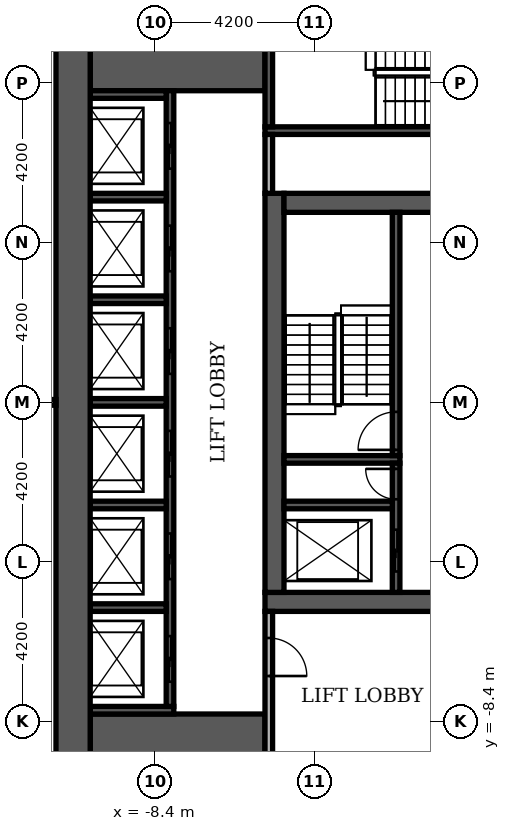
"""IFC4 building model, lengths in metres.
Left out: names, types, materials, properties, quantities, classifications, styles, units other than length and angle.
Written with IfcOpenShell. Run it as: python <this file> out.ifc"""

import sys

from ifc_helpers import new_model, si_unit, direction, frame, frame_2d, origin, place, context, subcontext, project, spatial, rectangle, extrude, element, fill, save


model = new_model("IFC4")
c1 = context("Model", 3, precision=1e-05, world=origin(), true_north=direction((0.0, 1.0)))
c2 = subcontext(c1, "Body", "Model", "MODEL_VIEW")
j1 = project(units=[si_unit("LENGTHUNIT", "METRE"), si_unit("PLANEANGLEUNIT", "RADIAN")], contexts=[c1])
p1 = place(None, origin())
s1 = spatial("IfcSite", under=j1, at=p1, CompositionType="ELEMENT")
p2 = place(p1, origin())
s2 = spatial("IfcBuilding", under=s1, at=p2, CompositionType="ELEMENT")
p3 = place(p2, origin())
s3 = spatial("IfcBuildingStorey", under=s2, at=p3, CompositionType="ELEMENT", Elevation=0.0)
p4 = place(p3, frame((-5.5, -5.25, 0.0), z_axis=(0.0, 0.0, 1.0), x_axis=(1.0, 0.0, 0.0)))
e1 = element("IfcWall", 1, at=p4, inside=s3, PredefinedType="SHEAR", context=c2, shape_type="SweptSolid", body=[
    extrude(rectangle(XDim=11.0, YDim=0.5, at=frame_2d((5.5, 0.0))), origin(), (0.0, 0.0, 1.0), 6.78),
])
p5 = place(p4, frame((4.9, 0.0, 0.0)))
e2 = element("IfcOpeningElement", 2, at=p5, cuts=e1, PredefinedType="OPENING", context=c2, shape_type="SweptSolid", body=[
    extrude(rectangle(XDim=1.2, YDim=2.1, at=frame_2d((0.6, 1.05))), frame((0.0, 0.26, 0.0), z_axis=(0.0, -1.0, 0.0), x_axis=(1.0, 0.0, 0.0)), (0.0, 0.0, 1.0), 0.52),
])
p6 = place(p3, frame((-5.25, -5.0, 0.0), z_axis=(0.0, 0.0, 1.0), x_axis=(0.0, 1.0, 0.0)))
e3 = element("IfcWall", 3, at=p6, inside=s3, PredefinedType="SHEAR", context=c2, shape_type="SweptSolid", body=[
    extrude(rectangle(XDim=10.5, YDim=0.5, at=frame_2d((5.25, 0.0))), origin(), (0.0, 0.0, 1.0), 6.78),
])
p7 = place(p3, frame((-5.0, 5.25, 0.0), z_axis=(0.0, 0.0, 1.0), x_axis=(1.0, 0.0, 0.0)))
e4 = element("IfcWall", 4, at=p7, inside=s3, PredefinedType="SHEAR", context=c2, shape_type="SweptSolid", body=[
    extrude(rectangle(XDim=10.0, YDim=0.5, at=frame_2d((5.0, 0.0))), origin(), (0.0, 0.0, 1.0), 6.78),
])
p8 = place(p7, frame((4.4, 0.0, 0.0)))
e5 = element("IfcOpeningElement", 5, at=p8, cuts=e4, PredefinedType="OPENING", context=c2, shape_type="SweptSolid", body=[
    extrude(rectangle(XDim=1.2, YDim=2.1, at=frame_2d((0.6, 1.05))), frame((0.0, 0.26, 0.0), z_axis=(0.0, -1.0, 0.0), x_axis=(1.0, 0.0, 0.0)), (0.0, 0.0, 1.0), 0.52),
])
for number, where, z_axis, x_axis in (
    (6, (-10.1, -9.15, 0.0), (0.0, 0.0, 1.0), (1.0, 0.0, 0.0)),
    (7, (-10.1, 9.15, 0.0), (0.0, 0.0, 1.0), (1.0, 0.0, 0.0)),
):
    element("IfcWall", number, at=place(p3, frame(where, z_axis=z_axis, x_axis=x_axis)), inside=s3, PredefinedType="SHEAR", context=c2, shape_type="SweptSolid", body=[
        extrude(rectangle(XDim=4.6, YDim=1.9, at=frame_2d((2.3, 0.0))), origin(), (0.0, 0.0, 1.0), 6.78),
    ])
p9 = place(p3, frame((-5.0, -1.5, 0.0), z_axis=(0.0, 0.0, 1.0), x_axis=(1.0, 0.0, 0.0)))
e8 = element("IfcWall", 8, at=p9, inside=s3, PredefinedType="SHEAR", context=c2, shape_type="SweptSolid", body=[
    extrude(rectangle(XDim=3.05, YDim=0.2, at=frame_2d((1.525, 0.0))), origin(), (0.0, 0.0, 1.0), 6.78),
])
p10 = place(p3, frame((-2.05, -1.4, 0.0), z_axis=(0.0, 0.0, 1.0), x_axis=(0.0, 1.0, 0.0)))
e9 = element("IfcWall", 9, at=p10, inside=s3, PredefinedType="SHEAR", context=c2, shape_type="SweptSolid", body=[
    extrude(rectangle(XDim=6.4, YDim=0.2, at=frame_2d((3.2, 0.0))), origin(), (0.0, 0.0, 1.0), 6.78),
])
p11 = place(p10, frame((0.15, 0.0, 0.0)))
e10 = element("IfcOpeningElement", 10, at=p11, cuts=e9, PredefinedType="OPENING", context=c2, shape_type="SweptSolid", body=[
    extrude(rectangle(XDim=1.0, YDim=2.1, at=frame_2d((0.5, 1.05))), frame((0.0, 0.11, 0.0), z_axis=(0.0, -1.0, 0.0), x_axis=(1.0, 0.0, 0.0)), (0.0, 0.0, 1.0), 0.22),
])
p12 = place(p3, frame((-5.5, 7.15, 0.0), z_axis=(0.0, 0.0, 1.0), x_axis=(1.0, 0.0, 0.0)))
e11 = element("IfcWall", 11, at=p12, inside=s3, PredefinedType="SHEAR", context=c2, shape_type="SweptSolid", body=[
    extrude(rectangle(XDim=6.8, YDim=0.2, at=frame_2d((3.4, 0.0))), origin(), (0.0, 0.0, 1.0), 6.78),
])
p13 = place(p3, frame((-5.4, 7.25, 0.0), z_axis=(0.0, 0.0, 1.0), x_axis=(0.0, 1.0, 0.0)))
e12 = element("IfcWall", 12, at=p13, inside=s3, PredefinedType="SHEAR", context=c2, shape_type="SweptSolid", body=[
    extrude(rectangle(XDim=2.85, YDim=0.2, at=frame_2d((1.425, 0.0))), origin(), (0.0, 0.0, 1.0), 6.78),
])
p14 = place(p3, frame((-10.1, -8.1, 0.0), z_axis=(0.0, 0.0, 1.0), x_axis=(1.0, 0.0, 0.0)))
e13 = element("IfcWall", 13, at=p14, inside=s3, PredefinedType="SHEAR", context=c2, shape_type="SweptSolid", body=[
    extrude(rectangle(XDim=2.2, YDim=0.2, at=frame_2d((1.1, 0.0))), origin(), (0.0, 0.0, 1.0), 6.78),
])
p15 = place(p3, frame((-8.0, -8.0, 0.0), z_axis=(0.0, 0.0, 1.0), x_axis=(0.0, 1.0, 0.0)))
e14 = element("IfcWall", 14, at=p15, inside=s3, PredefinedType="SHEAR", context=c2, shape_type="SweptSolid", body=[
    extrude(rectangle(XDim=16.2, YDim=0.2, at=frame_2d((8.1, 0.0))), origin(), (0.0, 0.0, 1.0), 6.78),
])
p16 = place(p15, frame((0.65, 0.0, 0.0)))
e15 = element("IfcOpeningElement", 15, at=p16, cuts=e14, PredefinedType="OPENING", context=c2, shape_type="SweptSolid", body=[
    extrude(rectangle(XDim=1.2, YDim=2.1, at=frame_2d((0.6, 1.05))), frame((0.0, 0.11, 0.0), z_axis=(0.0, -1.0, 0.0), x_axis=(1.0, 0.0, 0.0)), (0.0, 0.0, 1.0), 0.22),
])
p17 = place(p15, frame((3.35, 0.0, 0.0)))
e16 = element("IfcOpeningElement", 16, at=p17, cuts=e14, PredefinedType="OPENING", context=c2, shape_type="SweptSolid", body=[
    extrude(rectangle(XDim=1.2, YDim=2.1, at=frame_2d((0.6, 1.05))), frame((0.0, 0.11, 0.0), z_axis=(0.0, -1.0, 0.0), x_axis=(1.0, 0.0, 0.0)), (0.0, 0.0, 1.0), 0.22),
])
p18 = place(p15, frame((6.05, 0.0, 0.0)))
e17 = element("IfcOpeningElement", 17, at=p18, cuts=e14, PredefinedType="OPENING", context=c2, shape_type="SweptSolid", body=[
    extrude(rectangle(XDim=1.2, YDim=2.1, at=frame_2d((0.6, 1.05))), frame((0.0, 0.11, 0.0), z_axis=(0.0, -1.0, 0.0), x_axis=(1.0, 0.0, 0.0)), (0.0, 0.0, 1.0), 0.22),
])
p19 = place(p15, frame((8.75, 0.0, 0.0)))
e18 = element("IfcOpeningElement", 18, at=p19, cuts=e14, PredefinedType="OPENING", context=c2, shape_type="SweptSolid", body=[
    extrude(rectangle(XDim=1.2, YDim=2.1, at=frame_2d((0.6, 1.05))), frame((0.0, 0.11, 0.0), z_axis=(0.0, -1.0, 0.0), x_axis=(1.0, 0.0, 0.0)), (0.0, 0.0, 1.0), 0.22),
])
p20 = place(p15, frame((11.45, 0.0, 0.0)))
e19 = element("IfcOpeningElement", 19, at=p20, cuts=e14, PredefinedType="OPENING", context=c2, shape_type="SweptSolid", body=[
    extrude(rectangle(XDim=1.2, YDim=2.1, at=frame_2d((0.6, 1.05))), frame((0.0, 0.11, 0.0), z_axis=(0.0, -1.0, 0.0), x_axis=(1.0, 0.0, 0.0)), (0.0, 0.0, 1.0), 0.22),
])
p21 = place(p15, frame((14.15, 0.0, 0.0)))
e20 = element("IfcOpeningElement", 20, at=p21, cuts=e14, PredefinedType="OPENING", context=c2, shape_type="SweptSolid", body=[
    extrude(rectangle(XDim=1.2, YDim=2.1, at=frame_2d((0.6, 1.05))), frame((0.0, 0.11, 0.0), z_axis=(0.0, -1.0, 0.0), x_axis=(1.0, 0.0, 0.0)), (0.0, 0.0, 1.0), 0.22),
])
p22 = place(p3, frame((-10.1, -5.4, 0.0), z_axis=(0.0, 0.0, 1.0), x_axis=(1.0, 0.0, 0.0)))
e21 = element("IfcWall", 21, at=p22, inside=s3, PredefinedType="SHEAR", context=c2, shape_type="SweptSolid", body=[
    extrude(rectangle(XDim=2.0, YDim=0.2, at=frame_2d((1.0, 0.0))), origin(), (0.0, 0.0, 1.0), 6.78),
])
p23 = place(p3, frame((-2.05, -5.0, 0.0), z_axis=(0.0, 0.0, 1.0), x_axis=(0.0, 1.0, 0.0)))
e22 = element("IfcWall", 22, at=p23, inside=s3, PredefinedType="SHEAR", context=c2, shape_type="SweptSolid", body=[
    extrude(rectangle(XDim=3.4, YDim=0.2, at=frame_2d((1.7, 0.0))), origin(), (0.0, 0.0, 1.0), 6.78),
])
p24 = place(p23, frame((0.55, 0.0, 0.0)))
e23 = element("IfcOpeningElement", 23, at=p24, cuts=e22, PredefinedType="OPENING", context=c2, shape_type="SweptSolid", body=[
    extrude(rectangle(XDim=1.1, YDim=2.1, at=frame_2d((0.55, 1.05))), frame((0.0, 0.11, 0.0), z_axis=(0.0, -1.0, 0.0), x_axis=(1.0, 0.0, 0.0)), (0.0, 0.0, 1.0), 0.22),
])
p25 = place(p23, frame((2.45, 0.0, 0.0)))
e24 = element("IfcOpeningElement", 24, at=p25, cuts=e22, PredefinedType="OPENING", context=c2, shape_type="SweptSolid", body=[
    extrude(rectangle(XDim=0.8, YDim=2.1, at=frame_2d((0.4, 1.05))), frame((0.0, 0.11, 0.0), z_axis=(0.0, -1.0, 0.0), x_axis=(1.0, 0.0, 0.0)), (0.0, 0.0, 1.0), 0.22),
])
p26 = place(p3, frame((-10.1, -2.7, 0.0), z_axis=(0.0, 0.0, 1.0), x_axis=(1.0, 0.0, 0.0)))
e25 = element("IfcWall", 25, at=p26, inside=s3, PredefinedType="SHEAR", context=c2, shape_type="SweptSolid", body=[
    extrude(rectangle(XDim=2.0, YDim=0.2, at=frame_2d((1.0, 0.0))), origin(), (0.0, 0.0, 1.0), 6.78),
])
p27 = place(p3, frame((-5.0, -2.7, 0.0), z_axis=(0.0, 0.0, 1.0), x_axis=(1.0, 0.0, 0.0)))
e26 = element("IfcWall", 26, at=p27, inside=s3, PredefinedType="SHEAR", context=c2, shape_type="SweptSolid", body=[
    extrude(rectangle(XDim=2.85, YDim=0.2, at=frame_2d((1.425, 0.0))), origin(), (0.0, 0.0, 1.0), 6.78),
])
for number, where, z_axis, x_axis in (
    (27, (-10.1, 0.0, 0.0), (0.0, 0.0, 1.0), (1.0, 0.0, 0.0)),
    (28, (-10.1, 2.7, 0.0), (0.0, 0.0, 1.0), (1.0, 0.0, 0.0)),
    (29, (-10.1, 5.4, 0.0), (0.0, 0.0, 1.0), (1.0, 0.0, 0.0)),
    (30, (-10.1, 8.1, 0.0), (0.0, 0.0, 1.0), (1.0, 0.0, 0.0)),
):
    element("IfcWall", number, at=place(p3, frame(where, z_axis=z_axis, x_axis=x_axis)), inside=s3, PredefinedType="SHEAR", context=c2, shape_type="SweptSolid", body=[
        extrude(rectangle(XDim=2.0, YDim=0.2, at=frame_2d((1.0, 0.0))), origin(), (0.0, 0.0, 1.0), 6.78),
    ])
p28 = place(p3, frame((-10.55, -10.1, 0.0), z_axis=(0.0, 0.0, 1.0), x_axis=(0.0, 1.0, 0.0)))
e31 = element("IfcWall", 31, at=p28, inside=s3, PredefinedType="SHEAR", context=c2, shape_type="SweptSolid", body=[
    extrude(rectangle(XDim=20.2, YDim=0.9, at=frame_2d((10.1, 0.0))), origin(), (0.0, 0.0, 1.0), 6.78),
])
p29 = place(p3, frame((-5.4, -10.1, 0.0), z_axis=(0.0, 0.0, 1.0), x_axis=(0.0, 1.0, 0.0)))
e32 = element("IfcWall", 32, at=p29, inside=s3, PredefinedType="PARTITIONING", context=c2, shape_type="SweptSolid", body=[
    extrude(rectangle(XDim=4.6, YDim=0.2, at=frame_2d((2.3, 0.0))), origin(), (0.0, 0.0, 1.0), 6.78),
])
p30 = place(p29, frame((2.9, 0.0, 0.0)))
e33 = element("IfcOpeningElement", 33, at=p30, cuts=e32, PredefinedType="OPENING", context=c2, shape_type="SweptSolid", body=[
    extrude(rectangle(XDim=1.0, YDim=2.1, at=frame_2d((0.5, 1.05))), frame((0.0, 0.11, 0.0), z_axis=(0.0, -1.0, 0.0), x_axis=(1.0, 0.0, 0.0)), (0.0, 0.0, 1.0), 0.22),
])
p31 = place(p3, frame((-5.4, 5.5, 0.0), z_axis=(0.0, 0.0, 1.0), x_axis=(0.0, 1.0, 0.0)))
e34 = element("IfcWall", 34, at=p31, inside=s3, PredefinedType="PARTITIONING", context=c2, shape_type="SweptSolid", body=[
    extrude(rectangle(XDim=1.55, YDim=0.2, at=frame_2d((0.775, 0.0))), origin(), (0.0, 0.0, 1.0), 6.78),
])
p32 = place(p3, frame((-24.6, 0.0, 0.0), z_axis=(0.0, 0.0, 1.0), x_axis=(1.0, 0.0, 0.0)))
e35 = element("IfcWall", 35, at=p32, inside=s3, PredefinedType="PARTITIONING", context=c2, shape_type="SweptSolid", body=[
    extrude(rectangle(XDim=13.6, YDim=0.15, at=frame_2d((6.8, 0.0))), origin(), (0.0, 0.0, 1.0), 6.78),
])
p33 = place(p16, origin())
e36 = element("IfcDoor", 36, at=p33, inside=s3, OperationType="SLIDING_TO_LEFT", PredefinedType="DOOR", context=c2, shape_type="SweptSolid", body=[
    extrude(rectangle(XDim=1.2, YDim=2.1, at=frame_2d((0.6, 1.05))), frame((0.0, 0.025, 0.0), z_axis=(0.0, -1.0, 0.0), x_axis=(1.0, 0.0, 0.0)), (0.0, 0.0, 1.0), 0.05),
])
fill(e15, e36)
p34 = place(p17, origin())
e37 = element("IfcDoor", 37, at=p34, inside=s3, OperationType="SLIDING_TO_LEFT", PredefinedType="DOOR", context=c2, shape_type="SweptSolid", body=[
    extrude(rectangle(XDim=1.2, YDim=2.1, at=frame_2d((0.6, 1.05))), frame((0.0, 0.025, 0.0), z_axis=(0.0, -1.0, 0.0), x_axis=(1.0, 0.0, 0.0)), (0.0, 0.0, 1.0), 0.05),
])
fill(e16, e37)
p35 = place(p18, origin())
e38 = element("IfcDoor", 38, at=p35, inside=s3, OperationType="SLIDING_TO_LEFT", PredefinedType="DOOR", context=c2, shape_type="SweptSolid", body=[
    extrude(rectangle(XDim=1.2, YDim=2.1, at=frame_2d((0.6, 1.05))), frame((0.0, 0.025, 0.0), z_axis=(0.0, -1.0, 0.0), x_axis=(1.0, 0.0, 0.0)), (0.0, 0.0, 1.0), 0.05),
])
fill(e17, e38)
p36 = place(p19, origin())
e39 = element("IfcDoor", 39, at=p36, inside=s3, OperationType="SLIDING_TO_LEFT", PredefinedType="DOOR", context=c2, shape_type="SweptSolid", body=[
    extrude(rectangle(XDim=1.2, YDim=2.1, at=frame_2d((0.6, 1.05))), frame((0.0, 0.025, 0.0), z_axis=(0.0, -1.0, 0.0), x_axis=(1.0, 0.0, 0.0)), (0.0, 0.0, 1.0), 0.05),
])
fill(e18, e39)
p37 = place(p20, origin())
e40 = element("IfcDoor", 40, at=p37, inside=s3, OperationType="SLIDING_TO_LEFT", PredefinedType="DOOR", context=c2, shape_type="SweptSolid", body=[
    extrude(rectangle(XDim=1.2, YDim=2.1, at=frame_2d((0.6, 1.05))), frame((0.0, 0.025, 0.0), z_axis=(0.0, -1.0, 0.0), x_axis=(1.0, 0.0, 0.0)), (0.0, 0.0, 1.0), 0.05),
])
fill(e19, e40)
p38 = place(p21, origin())
e41 = element("IfcDoor", 41, at=p38, inside=s3, OperationType="SLIDING_TO_LEFT", PredefinedType="DOOR", context=c2, shape_type="SweptSolid", body=[
    extrude(rectangle(XDim=1.2, YDim=2.1, at=frame_2d((0.6, 1.05))), frame((0.0, 0.025, 0.0), z_axis=(0.0, -1.0, 0.0), x_axis=(1.0, 0.0, 0.0)), (0.0, 0.0, 1.0), 0.05),
])
fill(e20, e41)
p39 = place(p24, origin())
e42 = element("IfcDoor", 42, at=p39, inside=s3, OperationType="SLIDING_TO_LEFT", PredefinedType="DOOR", context=c2, shape_type="SweptSolid", body=[
    extrude(rectangle(XDim=1.1, YDim=2.1, at=frame_2d((0.55, 1.05))), frame((0.0, 0.025, 0.0), z_axis=(0.0, -1.0, 0.0), x_axis=(1.0, 0.0, 0.0)), (0.0, 0.0, 1.0), 0.05),
])
fill(e23, e42)
p40 = place(p11, origin())
e43 = element("IfcDoor", 43, at=p40, inside=s3, OperationType="SINGLE_SWING_LEFT", PredefinedType="DOOR", context=c2, shape_type="SweptSolid", body=[
    extrude(rectangle(XDim=1.0, YDim=2.1, at=frame_2d((0.5, 1.05))), frame((0.0, 0.025, 0.0), z_axis=(0.0, -1.0, 0.0), x_axis=(1.0, 0.0, 0.0)), (0.0, 0.0, 1.0), 0.05),
])
fill(e10, e43)
p41 = place(p25, origin())
e44 = element("IfcDoor", 44, at=p41, inside=s3, OperationType="SINGLE_SWING_RIGHT", PredefinedType="DOOR", context=c2, shape_type="SweptSolid", body=[
    extrude(rectangle(XDim=0.8, YDim=2.1, at=frame_2d((0.4, 1.05))), frame((0.0, 0.025, 0.0), z_axis=(0.0, -1.0, 0.0), x_axis=(1.0, 0.0, 0.0)), (0.0, 0.0, 1.0), 0.05),
])
fill(e24, e44)
p42 = place(p30, frame((1.0, 0.0, 0.0), z_axis=(0.0, 0.0, 1.0), x_axis=(-1.0, 0.0, 0.0)))
e45 = element("IfcDoor", 45, at=p42, inside=s3, OperationType="SINGLE_SWING_LEFT", PredefinedType="DOOR", context=c2, shape_type="SweptSolid", body=[
    extrude(rectangle(XDim=1.0, YDim=2.1, at=frame_2d((0.5, 1.05))), frame((0.0, 0.025, 0.0), z_axis=(0.0, -1.0, 0.0), x_axis=(1.0, 0.0, 0.0)), (0.0, 0.0, 1.0), 0.05),
])
fill(e33, e45)
save(model, sys.argv[1])
